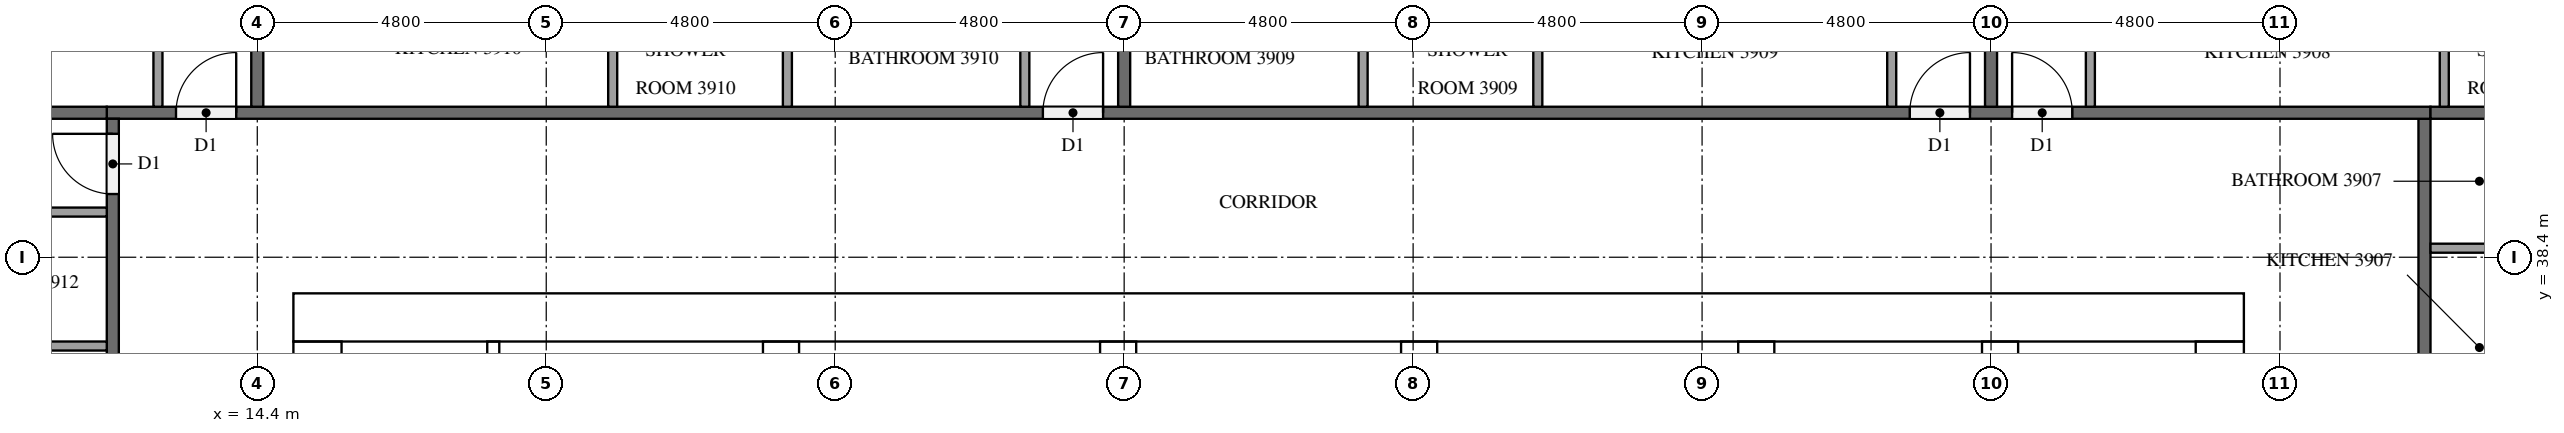
"""IFC4 building model, lengths in metres.
Left out: names, types, materials, properties, quantities, classifications, styles, units other than length and angle.
Written with IfcOpenShell. Run it as: python <this file> out.ifc"""

import sys

from ifc_helpers import new_model, si_unit, direction, frame, frame_2d, origin, place, context, subcontext, project, spatial, rectangle, extrude, element, fill, save


model = new_model("IFC4")
c1 = context("Model", 3, precision=1e-05, world=origin(), true_north=direction((0.0, 1.0)))
c2 = subcontext(c1, "Body", "Model", "MODEL_VIEW")
j1 = project(units=[si_unit("LENGTHUNIT", "METRE"), si_unit("PLANEANGLEUNIT", "RADIAN")], contexts=[c1])
p1 = place(None, origin())
s1 = spatial("IfcSite", under=j1, at=p1, CompositionType="ELEMENT")
p2 = place(p1, origin())
s2 = spatial("IfcBuilding", under=s1, at=p2, CompositionType="ELEMENT")
p3 = place(p2, frame((0.0, 0.0, 152.5)))
s3 = spatial("IfcBuildingStorey", under=s2, at=p3, CompositionType="ELEMENT", Elevation=152.5)
p4 = place(p3, frame((15.0, 37.4, 0.0), z_axis=(0.0, 0.0, 1.0), x_axis=(1.0, 0.0, 0.0)))
e1 = element("IfcWall", 1, at=p4, inside=s3, PredefinedType="SHEAR", context=c2, shape_type="SweptSolid", body=[
    extrude(rectangle(XDim=32.4, YDim=0.8, at=frame_2d((16.2, 0.0))), origin(), (0.0, 0.0, 1.0), 3.2),
])
p5 = place(p4, frame((15.3, 0.0, 0.0)))
e2 = element("IfcOpeningElement", 2, at=p5, cuts=e1, PredefinedType="OPENING", context=c2, shape_type="SweptSolid", body=[
    extrude(rectangle(XDim=1.8, YDim=2.1, at=frame_2d((0.9, 1.05))), frame((0.0, 0.41, 0.0), z_axis=(0.0, -1.0, 0.0), x_axis=(1.0, 0.0, 0.0)), (0.0, 0.0, 1.0), 0.82),
])
p6 = place(p4, frame((1.51, 0.0, 0.0)))
e3 = element("IfcOpeningElement", 3, at=p6, cuts=e1, PredefinedType="OPENING", context=c2, shape_type="SweptSolid", body=[
    extrude(rectangle(XDim=1.0, YDim=2.1, at=frame_2d((0.5, 1.05))), frame((0.0, 0.41, 0.0), z_axis=(0.0, -1.0, 0.0), x_axis=(1.0, 0.0, 0.0)), (0.0, 0.0, 1.0), 0.82),
])
p7 = place(p4, frame((5.11, 0.0, 0.0)))
e4 = element("IfcOpeningElement", 4, at=p7, cuts=e1, PredefinedType="OPENING", context=c2, shape_type="SweptSolid", body=[
    extrude(rectangle(XDim=1.0, YDim=2.1, at=frame_2d((0.5, 1.05))), frame((0.0, 0.41, 0.0), z_axis=(0.0, -1.0, 0.0), x_axis=(1.0, 0.0, 0.0)), (0.0, 0.0, 1.0), 0.82),
])
p8 = place(p3, frame((15.4, 15.8, 0.0), z_axis=(0.0, 0.0, 1.0), x_axis=(0.0, 1.0, 0.0)))
e5 = element("IfcWall", 5, at=p8, inside=s3, PredefinedType="SHEAR", context=c2, shape_type="SweptSolid", body=[
    extrude(rectangle(XDim=21.2, YDim=0.8, at=frame_2d((10.6, 0.0))), origin(), (0.0, 0.0, 1.0), 3.2),
])
p9 = place(p8, frame((4.96, 0.0, 0.0)))
e6 = element("IfcOpeningElement", 6, at=p9, cuts=e5, PredefinedType="OPENING", context=c2, shape_type="SweptSolid", body=[
    extrude(rectangle(XDim=1.2, YDim=2.1, at=frame_2d((0.6, 1.05))), frame((0.0, 0.41, 0.0), z_axis=(0.0, -1.0, 0.0), x_axis=(1.0, 0.0, 0.0)), (0.0, 0.0, 1.0), 0.82),
])
p10 = place(p3, frame((47.0, 15.8, 0.0), z_axis=(0.0, 0.0, 1.0), x_axis=(0.0, 1.0, 0.0)))
e7 = element("IfcWall", 7, at=p10, inside=s3, PredefinedType="SHEAR", context=c2, shape_type="SweptSolid", body=[
    extrude(rectangle(XDim=21.2, YDim=0.8, at=frame_2d((10.6, 0.0))), origin(), (0.0, 0.0, 1.0), 3.2),
])
p11 = place(p10, frame((10.3, 0.0, 0.0)))
e8 = element("IfcOpeningElement", 8, at=p11, cuts=e7, PredefinedType="OPENING", context=c2, shape_type="SweptSolid", body=[
    extrude(rectangle(XDim=1.2, YDim=2.1, at=frame_2d((0.6, 1.05))), frame((0.0, 0.41, 0.0), z_axis=(0.0, -1.0, 0.0), x_axis=(1.0, 0.0, 0.0)), (0.0, 0.0, 1.0), 0.82),
])
p12 = place(p3, frame((23.1, 15.8, 0.0), z_axis=(0.0, 0.0, 1.0), x_axis=(0.0, 1.0, 0.0)))
e9 = element("IfcWall", 9, at=p12, inside=s3, PredefinedType="SHEAR", context=c2, shape_type="SweptSolid", body=[
    extrude(rectangle(XDim=21.2, YDim=0.6, at=frame_2d((10.6, 0.0))), origin(), (0.0, 0.0, 1.0), 3.2),
])
p13 = place(p3, frame((39.3, 27.75, 0.0), z_axis=(0.0, 0.0, 1.0), x_axis=(0.0, 1.0, 0.0)))
e10 = element("IfcWall", 10, at=p13, inside=s3, PredefinedType="SHEAR", context=c2, shape_type="SweptSolid", body=[
    extrude(rectangle(XDim=9.25, YDim=0.6, at=frame_2d((4.625, 0.0))), origin(), (0.0, 0.0, 1.0), 3.2),
])
p14 = place(p3, frame((43.35, 27.75, 0.0), z_axis=(0.0, 0.0, 1.0), x_axis=(0.0, 1.0, 0.0)))
e11 = element("IfcWall", 11, at=p14, inside=s3, PredefinedType="SHEAR", context=c2, shape_type="SweptSolid", body=[
    extrude(rectangle(XDim=9.25, YDim=0.6, at=frame_2d((4.625, 0.0))), origin(), (0.0, 0.0, 1.0), 3.2),
])
p15 = place(p14, frame((7.65, 0.0, 0.0)))
e12 = element("IfcOpeningElement", 12, at=p15, cuts=e11, PredefinedType="OPENING", context=c2, shape_type="SweptSolid", body=[
    extrude(rectangle(XDim=1.2, YDim=2.1, at=frame_2d((0.6, 1.05))), frame((0.0, 0.31, 0.0), z_axis=(0.0, -1.0, 0.0), x_axis=(1.0, 0.0, 0.0)), (0.0, 0.0, 1.0), 0.62),
])
for number, where, z_axis, x_axis in (
    (13, (28.7, 33.85, 0.0), (0.0, 0.0, 1.0), (0.0, 1.0, 0.0)),
    (14, (33.7, 33.85, 0.0), (0.0, 0.0, 1.0), (0.0, 1.0, 0.0)),
):
    element("IfcWall", number, at=place(p3, frame(where, z_axis=z_axis, x_axis=x_axis)), inside=s3, PredefinedType="SHEAR", context=c2, shape_type="SweptSolid", body=[
        extrude(rectangle(XDim=3.15, YDim=0.6, at=frame_2d((1.575, 0.0))), origin(), (0.0, 0.0, 1.0), 3.2),
    ])
p16 = place(p3, frame((18.32, 31.55, 0.0), z_axis=(0.0, 0.0, 1.0), x_axis=(0.0, 1.0, 0.0)))
e15 = element("IfcWall", 15, at=p16, inside=s3, PredefinedType="PARTITIONING", context=c2, shape_type="SweptSolid", body=[
    extrude(rectangle(XDim=5.45, YDim=0.2, at=frame_2d((2.725, 0.0))), origin(), (0.0, 0.0, 1.0), 3.2),
])
p17 = place(p3, frame((50.4, 40.7, 0.0), z_axis=(0.0, 0.0, 1.0), x_axis=(0.0, -1.0, 0.0)))
e16 = element("IfcWall", 16, at=p17, inside=s3, PredefinedType="PARTITIONING", context=c2, shape_type="SweptSolid", body=[
    extrude(rectangle(XDim=28.6, YDim=0.2, at=frame_2d((14.3, 0.0))), origin(), (0.0, 0.0, 1.0), 3.2),
])
p18 = place(p17, frame((17.05, 0.0, 0.0)))
e17 = element("IfcOpeningElement", 17, at=p18, cuts=e16, PredefinedType="OPENING", context=c2, shape_type="SweptSolid", body=[
    extrude(rectangle(XDim=1.0, YDim=2.1, at=frame_2d((0.5, 1.05))), frame((0.0, 0.11, 0.0), z_axis=(0.0, -1.0, 0.0), x_axis=(1.0, 0.0, 0.0)), (0.0, 0.0, 1.0), 0.22),
])
p19 = place(p17, frame((15.35, 0.0, 0.0)))
e18 = element("IfcOpeningElement", 18, at=p19, cuts=e16, PredefinedType="OPENING", context=c2, shape_type="SweptSolid", body=[
    extrude(rectangle(XDim=1.0, YDim=2.1, at=frame_2d((0.5, 1.05))), frame((0.0, 0.11, 0.0), z_axis=(0.0, -1.0, 0.0), x_axis=(1.0, 0.0, 0.0)), (0.0, 0.0, 1.0), 0.22),
])
p20 = place(p17, frame((5.75, 0.0, 0.0)))
e19 = element("IfcOpeningElement", 19, at=p20, cuts=e16, PredefinedType="OPENING", context=c2, shape_type="SweptSolid", body=[
    extrude(rectangle(XDim=1.0, YDim=2.1, at=frame_2d((0.5, 1.05))), frame((0.0, 0.11, 0.0), z_axis=(0.0, -1.0, 0.0), x_axis=(1.0, 0.0, 0.0)), (0.0, 0.0, 1.0), 0.22),
])
p21 = place(p3, frame((11.9, 40.8, 0.0), z_axis=(0.0, 0.0, 1.0), x_axis=(1.0, 0.0, 0.0)))
e20 = element("IfcWall", 20, at=p21, inside=s3, PredefinedType="PARTITIONING", context=c2, shape_type="SweptSolid", body=[
    extrude(rectangle(XDim=38.6, YDim=0.2, at=frame_2d((19.3, 0.0))), origin(), (0.0, 0.0, 1.0), 3.2),
])
p22 = place(p21, frame((31.65, 0.0, 0.0)))
e21 = element("IfcOpeningElement", 21, at=p22, cuts=e20, PredefinedType="OPENING", context=c2, shape_type="SweptSolid", body=[
    extrude(rectangle(XDim=1.0, YDim=2.1, at=frame_2d((0.5, 1.05))), frame((0.0, 0.11, 0.0), z_axis=(0.0, -1.0, 0.0), x_axis=(1.0, 0.0, 0.0)), (0.0, 0.0, 1.0), 0.22),
])
p23 = place(p21, frame((29.95, 0.0, 0.0)))
e22 = element("IfcOpeningElement", 22, at=p23, cuts=e20, PredefinedType="OPENING", context=c2, shape_type="SweptSolid", body=[
    extrude(rectangle(XDim=1.0, YDim=2.1, at=frame_2d((0.5, 1.05))), frame((0.0, 0.11, 0.0), z_axis=(0.0, -1.0, 0.0), x_axis=(1.0, 0.0, 0.0)), (0.0, 0.0, 1.0), 0.22),
])
p24 = place(p21, frame((15.55, 0.0, 0.0)))
e23 = element("IfcOpeningElement", 23, at=p24, cuts=e20, PredefinedType="OPENING", context=c2, shape_type="SweptSolid", body=[
    extrude(rectangle(XDim=1.0, YDim=2.1, at=frame_2d((0.5, 1.05))), frame((0.0, 0.11, 0.0), z_axis=(0.0, -1.0, 0.0), x_axis=(1.0, 0.0, 0.0)), (0.0, 0.0, 1.0), 0.22),
])
p25 = place(p21, frame((1.15, 0.0, 0.0)))
e24 = element("IfcOpeningElement", 24, at=p25, cuts=e20, PredefinedType="OPENING", context=c2, shape_type="SweptSolid", body=[
    extrude(rectangle(XDim=1.0, YDim=2.1, at=frame_2d((0.5, 1.05))), frame((0.0, 0.11, 0.0), z_axis=(0.0, -1.0, 0.0), x_axis=(1.0, 0.0, 0.0)), (0.0, 0.0, 1.0), 0.22),
])
p26 = place(p3, frame((12.0, 12.1, 0.0), z_axis=(0.0, 0.0, 1.0), x_axis=(0.0, 1.0, 0.0)))
e25 = element("IfcWall", 25, at=p26, inside=s3, PredefinedType="PARTITIONING", context=c2, shape_type="SweptSolid", body=[
    extrude(rectangle(XDim=28.6, YDim=0.2, at=frame_2d((14.3, 0.0))), origin(), (0.0, 0.0, 1.0), 3.2),
])
p27 = place(p26, frame((27.35, 0.0, 0.0)))
e26 = element("IfcOpeningElement", 26, at=p27, cuts=e25, PredefinedType="OPENING", context=c2, shape_type="SweptSolid", body=[
    extrude(rectangle(XDim=1.0, YDim=2.1, at=frame_2d((0.5, 1.05))), frame((0.0, 0.11, 0.0), z_axis=(0.0, -1.0, 0.0), x_axis=(1.0, 0.0, 0.0)), (0.0, 0.0, 1.0), 0.22),
])
p28 = place(p26, frame((20.15, 0.0, 0.0)))
e27 = element("IfcOpeningElement", 27, at=p28, cuts=e25, PredefinedType="OPENING", context=c2, shape_type="SweptSolid", body=[
    extrude(rectangle(XDim=1.0, YDim=2.1, at=frame_2d((0.5, 1.05))), frame((0.0, 0.11, 0.0), z_axis=(0.0, -1.0, 0.0), x_axis=(1.0, 0.0, 0.0)), (0.0, 0.0, 1.0), 0.22),
])
p29 = place(p26, frame((10.55, 0.0, 0.0)))
e28 = element("IfcOpeningElement", 28, at=p29, cuts=e25, PredefinedType="OPENING", context=c2, shape_type="SweptSolid", body=[
    extrude(rectangle(XDim=1.0, YDim=2.1, at=frame_2d((0.5, 1.05))), frame((0.0, 0.11, 0.0), z_axis=(0.0, -1.0, 0.0), x_axis=(1.0, 0.0, 0.0)), (0.0, 0.0, 1.0), 0.22),
])
p30 = place(p3, frame((50.5, 40.8, 0.0), z_axis=(0.0, 0.0, 1.0), x_axis=(1.0, 0.0, 0.0)))
e29 = element("IfcWall", 29, at=p30, inside=s3, PredefinedType="PARTITIONING", context=c2, shape_type="SweptSolid", body=[
    extrude(rectangle(XDim=7.0, YDim=0.2, at=frame_2d((3.5, 0.0))), origin(), (0.0, 0.0, 1.0), 3.2),
])
p31 = place(p3, frame((43.2, 47.625, 0.0), z_axis=(0.0, 0.0, 1.0), x_axis=(0.0, -1.0, 0.0)))
e30 = element("IfcWall", 30, at=p31, inside=s3, PredefinedType="PARTITIONING", context=c2, shape_type="SweptSolid", body=[
    extrude(rectangle(XDim=6.725, YDim=0.2, at=frame_2d((3.363, 0.0))), origin(), (0.0, 0.0, 1.0), 3.2),
])
p32 = place(p3, frame((28.8, 47.9, 0.0), z_axis=(0.0, 0.0, 1.0), x_axis=(0.0, -1.0, 0.0)))
e31 = element("IfcWall", 31, at=p32, inside=s3, PredefinedType="PARTITIONING", context=c2, shape_type="SweptSolid", body=[
    extrude(rectangle(XDim=7.0, YDim=0.2, at=frame_2d((3.5, 0.0))), origin(), (0.0, 0.0, 1.0), 3.2),
])
p33 = place(p3, frame((14.4, 47.625, 0.0), z_axis=(0.0, 0.0, 1.0), x_axis=(0.0, -1.0, 0.0)))
e32 = element("IfcWall", 32, at=p33, inside=s3, PredefinedType="PARTITIONING", context=c2, shape_type="SweptSolid", body=[
    extrude(rectangle(XDim=6.725, YDim=0.2, at=frame_2d((3.363, 0.0))), origin(), (0.0, 0.0, 1.0), 3.2),
])
p34 = place(p3, frame((0.1, 40.8, 0.0), z_axis=(0.0, 0.0, 1.0), x_axis=(1.0, 0.0, 0.0)))
e33 = element("IfcWall", 33, at=p34, inside=s3, PredefinedType="PARTITIONING", context=c2, shape_type="SweptSolid", body=[
    extrude(rectangle(XDim=11.8, YDim=0.2, at=frame_2d((5.9, 0.0))), origin(), (0.0, 0.0, 1.0), 3.2),
])
p35 = place(p3, frame((50.5, 38.55, 0.0), z_axis=(0.0, 0.0, 1.0), x_axis=(1.0, 0.0, 0.0)))
e34 = element("IfcWall", 34, at=p35, inside=s3, PredefinedType="PARTITIONING", context=c2, shape_type="SweptSolid", body=[
    extrude(rectangle(XDim=1.625, YDim=0.15, at=frame_2d((0.812, 0.0))), origin(), (0.0, 0.0, 1.0), 3.2),
])
p36 = place(p3, frame((50.729, 40.9, 0.0), z_axis=(0.0, 0.0, 1.0), x_axis=(0.0, 1.0, 0.0)))
e35 = element("IfcWall", 35, at=p36, inside=s3, PredefinedType="PARTITIONING", context=c2, shape_type="SweptSolid", body=[
    extrude(rectangle(XDim=1.775, YDim=0.15, at=frame_2d((0.888, 0.0))), origin(), (0.0, 0.0, 1.0), 3.2),
])
p37 = place(p3, frame((44.85, 40.9, 0.0), z_axis=(0.0, 0.0, 1.0), x_axis=(0.0, 1.0, 0.0)))
e36 = element("IfcWall", 36, at=p37, inside=s3, PredefinedType="PARTITIONING", context=c2, shape_type="SweptSolid", body=[
    extrude(rectangle(XDim=1.925, YDim=0.15, at=frame_2d((0.962, 0.0))), origin(), (0.0, 0.0, 1.0), 3.2),
])
for number, where, z_axis, x_axis in (
    (37, (35.671, 40.9, 0.0), (0.0, 0.0, 1.0), (0.0, 1.0, 0.0)),
    (38, (32.769, 40.9, 0.0), (0.0, 0.0, 1.0), (0.0, 1.0, 0.0)),
):
    element("IfcWall", number, at=place(p3, frame(where, z_axis=z_axis, x_axis=x_axis)), inside=s3, PredefinedType="PARTITIONING", context=c2, shape_type="SweptSolid", body=[
        extrude(rectangle(XDim=1.775, YDim=0.15, at=frame_2d((0.888, 0.0))), origin(), (0.0, 0.0, 1.0), 3.2),
    ])
p38 = place(p3, frame((41.55, 40.9, 0.0), z_axis=(0.0, 0.0, 1.0), x_axis=(0.0, 1.0, 0.0)))
e39 = element("IfcWall", 39, at=p38, inside=s3, PredefinedType="PARTITIONING", context=c2, shape_type="SweptSolid", body=[
    extrude(rectangle(XDim=1.925, YDim=0.15, at=frame_2d((0.962, 0.0))), origin(), (0.0, 0.0, 1.0), 3.2),
])
for number, where, z_axis, x_axis in (
    (40, (23.206, 40.9, 0.0), (0.0, 0.0, 1.0), (0.0, 1.0, 0.0)),
    (41, (20.304, 40.9, 0.0), (0.0, 0.0, 1.0), (0.0, 1.0, 0.0)),
):
    element("IfcWall", number, at=place(p3, frame(where, z_axis=z_axis, x_axis=x_axis)), inside=s3, PredefinedType="PARTITIONING", context=c2, shape_type="SweptSolid", body=[
        extrude(rectangle(XDim=1.775, YDim=0.15, at=frame_2d((0.888, 0.0))), origin(), (0.0, 0.0, 1.0), 3.2),
    ])
p39 = place(p3, frame((27.15, 40.9, 0.0), z_axis=(0.0, 0.0, 1.0), x_axis=(0.0, 1.0, 0.0)))
e42 = element("IfcWall", 42, at=p39, inside=s3, PredefinedType="PARTITIONING", context=c2, shape_type="SweptSolid", body=[
    extrude(rectangle(XDim=1.925, YDim=0.15, at=frame_2d((0.962, 0.0))), origin(), (0.0, 0.0, 1.0), 3.2),
])
p40 = place(p3, frame((12.75, 40.9, 0.0), z_axis=(0.0, 0.0, 1.0), x_axis=(0.0, 1.0, 0.0)))
e43 = element("IfcWall", 43, at=p40, inside=s3, PredefinedType="PARTITIONING", context=c2, shape_type="SweptSolid", body=[
    extrude(rectangle(XDim=2.225, YDim=0.15, at=frame_2d((1.113, 0.0))), origin(), (0.0, 0.0, 1.0), 3.2),
])
p41 = place(p3, frame((11.9, 36.925, 0.0), z_axis=(0.0, 0.0, 1.0), x_axis=(-1.0, 0.0, 0.0)))
e44 = element("IfcWall", 44, at=p41, inside=s3, PredefinedType="PARTITIONING", context=c2, shape_type="SweptSolid", body=[
    extrude(rectangle(XDim=3.725, YDim=0.15, at=frame_2d((1.862, 0.0))), origin(), (0.0, 0.0, 1.0), 3.2),
])
p42 = place(p3, frame((11.9, 39.15, 0.0), z_axis=(0.0, 0.0, 1.0), x_axis=(-1.0, 0.0, 0.0)))
e45 = element("IfcWall", 45, at=p42, inside=s3, PredefinedType="PARTITIONING", context=c2, shape_type="SweptSolid", body=[
    extrude(rectangle(XDim=3.875, YDim=0.15, at=frame_2d((1.938, 0.0))), origin(), (0.0, 0.0, 1.0), 3.2),
])
p43 = place(p5, origin())
e46 = element("IfcDoor", 46, at=p43, inside=s3, OperationType="DOUBLE_DOOR_SINGLE_SWING", PredefinedType="DOOR", context=c2, shape_type="SweptSolid", body=[
    extrude(rectangle(XDim=1.8, YDim=2.1, at=frame_2d((0.9, 1.05))), frame((0.0, 0.025, 0.0), z_axis=(0.0, -1.0, 0.0), x_axis=(1.0, 0.0, 0.0)), (0.0, 0.0, 1.0), 0.05),
])
fill(e2, e46)
p44 = place(p6, origin())
e47 = element("IfcDoor", 47, at=p44, inside=s3, OperationType="SINGLE_SWING_RIGHT", PredefinedType="DOOR", context=c2, shape_type="SweptSolid", body=[
    extrude(rectangle(XDim=1.0, YDim=2.1, at=frame_2d((0.5, 1.05))), frame((0.0, 0.025, 0.0), z_axis=(0.0, -1.0, 0.0), x_axis=(1.0, 0.0, 0.0)), (0.0, 0.0, 1.0), 0.05),
])
fill(e3, e47)
p45 = place(p7, origin())
e48 = element("IfcDoor", 48, at=p45, inside=s3, OperationType="SINGLE_SWING_LEFT", PredefinedType="DOOR", context=c2, shape_type="SweptSolid", body=[
    extrude(rectangle(XDim=1.0, YDim=2.1, at=frame_2d((0.5, 1.05))), frame((0.0, 0.025, 0.0), z_axis=(0.0, -1.0, 0.0), x_axis=(1.0, 0.0, 0.0)), (0.0, 0.0, 1.0), 0.05),
])
fill(e4, e48)
p46 = place(p22, origin())
e49 = element("IfcDoor", 49, at=p46, inside=s3, OperationType="SINGLE_SWING_LEFT", PredefinedType="DOOR", context=c2, shape_type="SweptSolid", body=[
    extrude(rectangle(XDim=1.0, YDim=2.1, at=frame_2d((0.5, 1.05))), frame((0.0, 0.025, 0.0), z_axis=(0.0, -1.0, 0.0), x_axis=(1.0, 0.0, 0.0)), (0.0, 0.0, 1.0), 0.05),
])
fill(e21, e49)
p47 = place(p23, origin())
e50 = element("IfcDoor", 50, at=p47, inside=s3, OperationType="SINGLE_SWING_RIGHT", PredefinedType="DOOR", context=c2, shape_type="SweptSolid", body=[
    extrude(rectangle(XDim=1.0, YDim=2.1, at=frame_2d((0.5, 1.05))), frame((0.0, 0.025, 0.0), z_axis=(0.0, -1.0, 0.0), x_axis=(1.0, 0.0, 0.0)), (0.0, 0.0, 1.0), 0.05),
])
fill(e22, e50)
p48 = place(p24, origin())
e51 = element("IfcDoor", 51, at=p48, inside=s3, OperationType="SINGLE_SWING_RIGHT", PredefinedType="DOOR", context=c2, shape_type="SweptSolid", body=[
    extrude(rectangle(XDim=1.0, YDim=2.1, at=frame_2d((0.5, 1.05))), frame((0.0, 0.025, 0.0), z_axis=(0.0, -1.0, 0.0), x_axis=(1.0, 0.0, 0.0)), (0.0, 0.0, 1.0), 0.05),
])
fill(e23, e51)
p49 = place(p25, origin())
e52 = element("IfcDoor", 52, at=p49, inside=s3, OperationType="SINGLE_SWING_RIGHT", PredefinedType="DOOR", context=c2, shape_type="SweptSolid", body=[
    extrude(rectangle(XDim=1.0, YDim=2.1, at=frame_2d((0.5, 1.05))), frame((0.0, 0.025, 0.0), z_axis=(0.0, -1.0, 0.0), x_axis=(1.0, 0.0, 0.0)), (0.0, 0.0, 1.0), 0.05),
])
fill(e24, e52)
p50 = place(p27, origin())
e53 = element("IfcDoor", 53, at=p50, inside=s3, OperationType="SINGLE_SWING_RIGHT", PredefinedType="DOOR", context=c2, shape_type="SweptSolid", body=[
    extrude(rectangle(XDim=1.0, YDim=2.1, at=frame_2d((0.5, 1.05))), frame((0.0, 0.025, 0.0), z_axis=(0.0, -1.0, 0.0), x_axis=(1.0, 0.0, 0.0)), (0.0, 0.0, 1.0), 0.05),
])
fill(e26, e53)
save(model, sys.argv[1])
